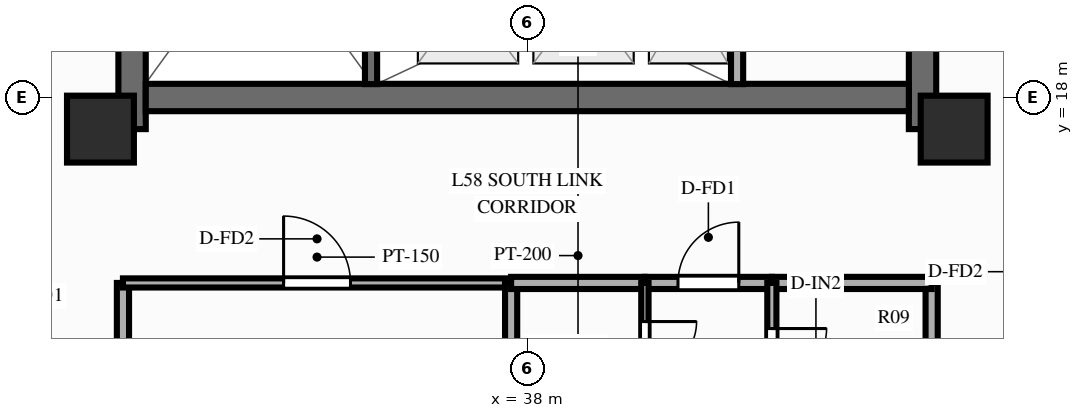
"""IFC4 building model, lengths in metres.
Left out: names, types, materials, properties, quantities, classifications, styles, units other than length and angle.
Written with IfcOpenShell. Run it as: python <this file> out.ifc"""

import sys

from ifc_helpers import new_model, si_unit, direction, frame, frame_2d, origin, origin_2d, place, context, subcontext, project, spatial, rectangle, extrude, source, transform, mapped, element, fill, save


model = new_model("IFC4")
c1 = context("Model", 3, precision=1e-05, world=origin(), true_north=direction((0.0, 1.0)))
c2 = subcontext(c1, "Body", "Model", "MODEL_VIEW")
j1 = project(units=[si_unit("LENGTHUNIT", "METRE"), si_unit("PLANEANGLEUNIT", "RADIAN")], contexts=[c1])
p1 = place(None, origin())
s1 = spatial("IfcSite", under=j1, at=p1, CompositionType="ELEMENT")
p2 = place(p1, origin())
s2 = spatial("IfcBuilding", under=s1, at=p2, CompositionType="ELEMENT")
p3 = place(p2, frame((0.0, 0.0, 186.7)))
s3 = spatial("IfcBuildingStorey", under=s2, at=p3, CompositionType="ELEMENT", Elevation=186.7)
p4 = place(p3, frame((31.5, 17.48, 0.0), z_axis=(0.0, 0.0, 1.0), x_axis=(0.0, 1.0, 0.0)))
e1 = element("IfcWall", 1, at=p4, inside=s3, PredefinedType="SHEAR", context=c2, shape_type="SweptSolid", body=[
    extrude(rectangle(XDim=19.04, YDim=0.45, at=frame_2d((9.52, 0.0))), origin(), (0.0, 0.0, 1.0), 3.0),
])
p5 = place(p4, frame((6.32, 0.0, 0.0)))
e2 = element("IfcOpeningElement", 2, at=p5, cuts=e1, PredefinedType="OPENING", context=c2, shape_type="SweptSolid", body=[
    extrude(rectangle(XDim=1.1, YDim=2.15, at=frame_2d((0.55, 1.075))), frame((0.0, 0.237, 0.0), z_axis=(0.0, -1.0, 0.0), x_axis=(1.0, 0.0, 0.0)), (0.0, 0.0, 1.0), 0.474),
])
p6 = place(p3, frame((44.5, 17.48, 0.0), z_axis=(0.0, 0.0, 1.0), x_axis=(0.0, 1.0, 0.0)))
e3 = element("IfcWall", 3, at=p6, inside=s3, PredefinedType="SHEAR", context=c2, shape_type="SweptSolid", body=[
    extrude(rectangle(XDim=19.04, YDim=0.45, at=frame_2d((9.52, 0.0))), origin(), (0.0, 0.0, 1.0), 3.0),
])
p7 = place(p6, frame((12.67, 0.0, 0.0), z_axis=(0.0, 0.0, 1.0), x_axis=(-1.0, 0.0, 0.0)))
e4 = element("IfcOpeningElement", 4, at=p7, cuts=e3, PredefinedType="OPENING", context=c2, shape_type="SweptSolid", body=[
    extrude(rectangle(XDim=1.1, YDim=2.15, at=frame_2d((0.55, 1.075))), frame((0.0, 0.237, 0.0), z_axis=(0.0, -1.0, 0.0), x_axis=(1.0, 0.0, 0.0)), (0.0, 0.0, 1.0), 0.474),
])
p8 = place(p3, frame((31.725, 18.0, 0.0), z_axis=(0.0, 0.0, 1.0), x_axis=(1.0, 0.0, 0.0)))
e5 = element("IfcWall", 5, at=p8, inside=s3, PredefinedType="SHEAR", context=c2, shape_type="SweptSolid", body=[
    extrude(rectangle(XDim=12.55, YDim=0.45, at=frame_2d((6.275, 0.0))), origin(), (0.0, 0.0, 1.0), 3.0),
])
m1 = source(origin(), c2, "Body", "SweptSolid", [
    extrude(rectangle(XDim=1.1, YDim=1.1, at=origin_2d()), origin(), (0.0, 0.0, 1.0), 3.0),
])
for number, where, z_axis, x_axis in (
    (6, (30.98, 17.48, 0.0), (0.0, 0.0, 1.0), (1.0, 0.0, 0.0)),
    (7, (45.02, 17.48, 0.0), (0.0, 0.0, 1.0), (1.0, 0.0, 0.0)),
):
    element("IfcColumn", number, at=place(p3, frame(where, z_axis=z_axis, x_axis=x_axis)), inside=s3, PredefinedType="COLUMN", context=c2, shape_type="MappedRepresentation", body=[
        mapped(m1, transform((0.0, 0.0, 0.0), scale=1.0)),
    ])
p9 = place(p3, frame((41.45, 18.22, 0.0), z_axis=(0.0, 0.0, 1.0), x_axis=(0.0, 1.0, 0.0)))
e8 = element("IfcWall", 8, at=p9, inside=s3, PredefinedType="PARTITIONING", context=c2, shape_type="SweptSolid", body=[
    extrude(rectangle(XDim=2.96, YDim=0.2, at=frame_2d((1.48, 0.0))), origin(), (0.0, 0.0, 1.0), 2.79),
])
p10 = place(p3, frame((35.43, 18.22, 0.0), z_axis=(0.0, 0.0, 1.0), x_axis=(0.0, 1.0, 0.0)))
e9 = element("IfcWall", 9, at=p10, inside=s3, PredefinedType="SOLIDWALL", context=c2, shape_type="SweptSolid", body=[
    extrude(rectangle(XDim=7.22, YDim=0.2, at=frame_2d((3.61, 0.0))), origin(), (0.0, 0.0, 1.0), 2.79),
])
p11 = place(p10, frame((6.68, 0.0, 0.0), z_axis=(0.0, 0.0, 1.0), x_axis=(-1.0, 0.0, 0.0)))
e10 = element("IfcOpeningElement", 10, at=p11, cuts=e9, PredefinedType="OPENING", context=c2, shape_type="SweptSolid", body=[
    extrude(rectangle(XDim=1.1, YDim=2.15, at=frame_2d((0.55, 1.075))), frame((0.0, 0.112, 0.0), z_axis=(0.0, -1.0, 0.0), x_axis=(1.0, 0.0, 0.0)), (0.0, 0.0, 1.0), 0.224),
])
for number, where, z_axis, x_axis in (
    (11, (31.35, 14.95, 0.0), (0.0, 0.0, 1.0), (0.0, -1.0, 0.0)),
    (12, (44.65, 14.95, 0.0), (0.0, 0.0, 1.0), (0.0, -1.0, 0.0)),
):
    element("IfcWall", number, at=place(p3, frame(where, z_axis=z_axis, x_axis=x_axis)), inside=s3, PredefinedType="PARTITIONING", context=c2, shape_type="SweptSolid", body=[
        extrude(rectangle(XDim=8.8, YDim=0.2, at=frame_2d((4.4, 0.0))), origin(), (0.0, 0.0, 1.0), 2.39),
    ])
p12 = place(p3, frame((31.35, 14.95, 0.0), z_axis=(0.0, 0.0, 1.0), x_axis=(1.0, 0.0, 0.0)))
e13 = element("IfcWall", 13, at=p12, inside=s3, PredefinedType="PARTITIONING", context=c2, shape_type="SweptSolid", body=[
    extrude(rectangle(XDim=6.384, YDim=0.15, at=frame_2d((3.192, 0.0))), origin(), (0.0, 0.0, 1.0), 2.79),
])
p13 = place(p12, frame((2.642, 0.0, 0.0)))
e14 = element("IfcOpeningElement", 14, at=p13, cuts=e13, PredefinedType="OPENING", context=c2, shape_type="SweptSolid", body=[
    extrude(rectangle(XDim=1.1, YDim=2.15, at=frame_2d((0.55, 1.075))), frame((0.0, 0.087, 0.0), z_axis=(0.0, -1.0, 0.0), x_axis=(1.0, 0.0, 0.0)), (0.0, 0.0, 1.0), 0.174),
])
p14 = place(p3, frame((37.734, 14.95, 0.0), z_axis=(0.0, 0.0, 1.0), x_axis=(0.0, -1.0, 0.0)))
e15 = element("IfcWall", 15, at=p14, inside=s3, PredefinedType="PARTITIONING", context=c2, shape_type="SweptSolid", body=[
    extrude(rectangle(XDim=8.8, YDim=0.2, at=frame_2d((4.4, 0.0))), origin(), (0.0, 0.0, 1.0), 2.79),
])
p15 = place(p3, frame((37.734, 14.95, 0.0), z_axis=(0.0, 0.0, 1.0), x_axis=(1.0, 0.0, 0.0)))
e16 = element("IfcWall", 16, at=p15, inside=s3, PredefinedType="PARTITIONING", context=c2, shape_type="SweptSolid", body=[
    extrude(rectangle(XDim=2.2, YDim=0.2, at=frame_2d((1.1, 0.0))), origin(), (0.0, 0.0, 1.0), 2.79),
])
p16 = place(p3, frame((39.934, 14.95, 0.0), z_axis=(0.0, 0.0, 1.0), x_axis=(1.0, 0.0, 0.0)))
e17 = element("IfcWall", 17, at=p16, inside=s3, PredefinedType="PARTITIONING", context=c2, shape_type="SweptSolid", body=[
    extrude(rectangle(XDim=2.088, YDim=0.2, at=frame_2d((1.044, 0.0))), origin(), (0.0, 0.0, 1.0), 2.79),
])
p17 = place(p16, frame((0.544, 0.0, 0.0)))
e18 = element("IfcOpeningElement", 18, at=p17, cuts=e17, PredefinedType="OPENING", context=c2, shape_type="SweptSolid", body=[
    extrude(rectangle(XDim=1.0, YDim=2.15, at=frame_2d((0.5, 1.075))), frame((0.0, 0.112, 0.0), z_axis=(0.0, -1.0, 0.0), x_axis=(1.0, 0.0, 0.0)), (0.0, 0.0, 1.0), 0.224),
])
p18 = place(p3, frame((42.022, 14.95, 0.0), z_axis=(0.0, 0.0, 1.0), x_axis=(1.0, 0.0, 0.0)))
e19 = element("IfcWall", 19, at=p18, inside=s3, PredefinedType="PARTITIONING", context=c2, shape_type="SweptSolid", body=[
    extrude(rectangle(XDim=2.628, YDim=0.2, at=frame_2d((1.314, 0.0))), origin(), (0.0, 0.0, 1.0), 2.79),
])
p19 = place(p3, frame((39.934, 14.95, 0.0), z_axis=(0.0, 0.0, 1.0), x_axis=(0.0, -1.0, 0.0)))
e20 = element("IfcWall", 20, at=p19, inside=s3, PredefinedType="PARTITIONING", context=c2, shape_type="SweptSolid", body=[
    extrude(rectangle(XDim=2.12, YDim=0.12, at=frame_2d((1.06, 0.0))), origin(), (0.0, 0.0, 1.0), 2.79),
])
p20 = place(p19, frame((0.635, 0.0, 0.0)))
e21 = element("IfcOpeningElement", 21, at=p20, cuts=e20, PredefinedType="OPENING", context=c2, shape_type="SweptSolid", body=[
    extrude(rectangle(XDim=0.85, YDim=2.05, at=frame_2d((0.425, 1.025))), frame((0.0, 0.072, 0.0), z_axis=(0.0, -1.0, 0.0), x_axis=(1.0, 0.0, 0.0)), (0.0, 0.0, 1.0), 0.144),
])
p21 = place(p3, frame((42.022, 14.95, 0.0), z_axis=(0.0, 0.0, 1.0), x_axis=(0.0, -1.0, 0.0)))
e22 = element("IfcWall", 22, at=p21, inside=s3, PredefinedType="PARTITIONING", context=c2, shape_type="SweptSolid", body=[
    extrude(rectangle(XDim=2.4, YDim=0.15, at=frame_2d((1.2, 0.0))), origin(), (0.0, 0.0, 1.0), 2.79),
])
p22 = place(p21, frame((0.75, 0.0, 0.0)))
e23 = element("IfcOpeningElement", 23, at=p22, cuts=e22, PredefinedType="OPENING", context=c2, shape_type="SweptSolid", body=[
    extrude(rectangle(XDim=0.9, YDim=2.1, at=frame_2d((0.45, 1.05))), frame((0.0, 0.087, 0.0), z_axis=(0.0, -1.0, 0.0), x_axis=(1.0, 0.0, 0.0)), (0.0, 0.0, 1.0), 0.174),
])
m2 = source(origin(), c2, "Body", "SweptSolid", [
    extrude(rectangle(XDim=1.1, YDim=2.15, at=frame_2d((0.55, 1.075))), frame((0.0, 0.025, 0.0), z_axis=(0.0, -1.0, 0.0), x_axis=(1.0, 0.0, 0.0)), (0.0, 0.0, 1.0), 0.05),
])
p23 = place(p13, origin())
e24 = element("IfcDoor", 24, at=p23, inside=s3, OperationType="SINGLE_SWING_LEFT", PredefinedType="DOOR", context=c2, shape_type="MappedRepresentation", body=[
    mapped(m2, transform((0.0, 0.0, 0.0), scale=1.0)),
])
fill(e14, e24)
m3 = source(origin(), c2, "Body", "SweptSolid", [
    extrude(rectangle(XDim=1.0, YDim=2.15, at=frame_2d((0.5, 1.075))), frame((0.0, 0.025, 0.0), z_axis=(0.0, -1.0, 0.0), x_axis=(1.0, 0.0, 0.0)), (0.0, 0.0, 1.0), 0.05),
])
p24 = place(p17, origin())
e25 = element("IfcDoor", 25, at=p24, inside=s3, OperationType="SINGLE_SWING_RIGHT", PredefinedType="DOOR", context=c2, shape_type="MappedRepresentation", body=[
    mapped(m3, transform((0.0, 0.0, 0.0), scale=1.0)),
])
fill(e18, e25)
m4 = source(origin(), c2, "Body", "SweptSolid", [
    extrude(rectangle(XDim=0.85, YDim=2.05, at=frame_2d((0.425, 1.025))), frame((0.0, 0.025, 0.0), z_axis=(0.0, -1.0, 0.0), x_axis=(1.0, 0.0, 0.0)), (0.0, 0.0, 1.0), 0.05),
])
p25 = place(p20, origin())
e26 = element("IfcDoor", 26, at=p25, inside=s3, OperationType="SINGLE_SWING_LEFT", PredefinedType="DOOR", context=c2, shape_type="MappedRepresentation", body=[
    mapped(m4, transform((0.0, 0.0, 0.0), scale=1.0)),
])
fill(e21, e26)
m5 = source(origin(), c2, "Body", "SweptSolid", [
    extrude(rectangle(XDim=0.9, YDim=2.1, at=frame_2d((0.45, 1.05))), frame((0.0, 0.025, 0.0), z_axis=(0.0, -1.0, 0.0), x_axis=(1.0, 0.0, 0.0)), (0.0, 0.0, 1.0), 0.05),
])
p26 = place(p22, origin())
e27 = element("IfcDoor", 27, at=p26, inside=s3, OperationType="SINGLE_SWING_LEFT", PredefinedType="DOOR", context=c2, shape_type="MappedRepresentation", body=[
    mapped(m5, transform((0.0, 0.0, 0.0), scale=1.0)),
])
fill(e23, e27)
save(model, sys.argv[1])
